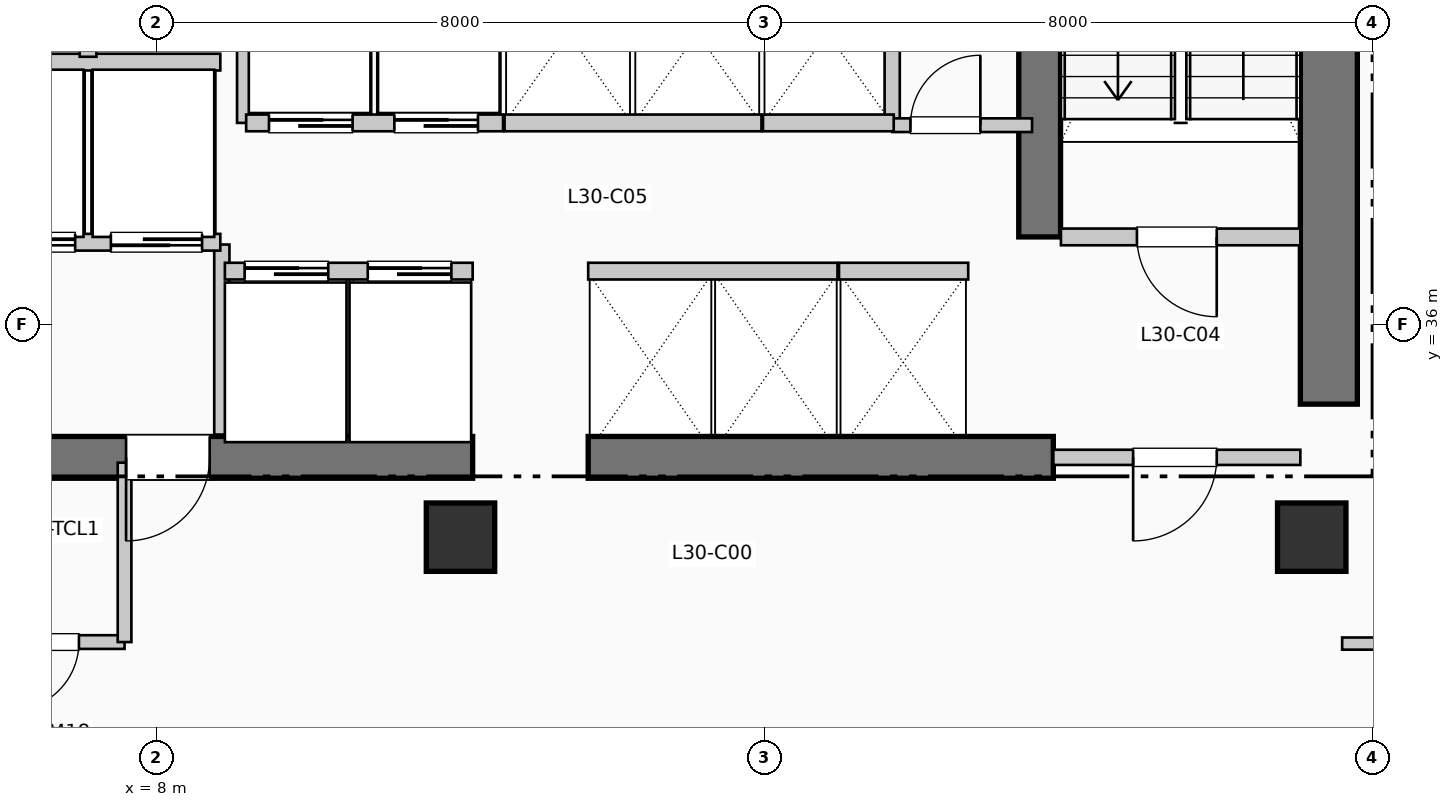
"""IFC4 building model, lengths in metres.
Left out: names, types, materials, properties, quantities, classifications, styles, units other than length and angle.
Written with IfcOpenShell. Run it as: python <this file> out.ifc"""

import sys

from ifc_helpers import new_model, si_unit, direction, frame, frame_2d, origin, origin_2d, place, context, subcontext, project, spatial, rectangle, extrude, element, fill, save


model = new_model("IFC4")
c1 = context("Model", 3, precision=1e-05, world=origin(), true_north=direction((0.0, 1.0)))
c2 = subcontext(c1, "Body", "Model", "MODEL_VIEW")
j1 = project(units=[si_unit("LENGTHUNIT", "METRE"), si_unit("PLANEANGLEUNIT", "RADIAN")], contexts=[c1])
p1 = place(None, origin())
s1 = spatial("IfcSite", under=j1, at=p1, CompositionType="ELEMENT")
p2 = place(p1, origin())
s2 = spatial("IfcBuilding", under=s1, at=p2, CompositionType="ELEMENT")
p3 = place(p2, frame((0.0, 0.0, 126.39)))
s3 = spatial("IfcBuildingStorey", under=s2, at=p3, CompositionType="ELEMENT", Elevation=126.39)
p4 = place(p3, frame((23.425, 34.95, 0.0), z_axis=(0.0, 0.0, 1.0), x_axis=(0.0, 1.0, 0.0)))
e1 = element("IfcWall", 1, at=p4, inside=s3, PredefinedType="SHEAR", context=c2, shape_type="SweptSolid", body=[
    extrude(rectangle(XDim=10.64, YDim=0.75, at=frame_2d((5.32, 0.0))), origin(), (0.0, 0.0, 1.0), 3.96),
])
p5 = place(p3, frame((1.45, 34.25, 0.0), z_axis=(0.0, 0.0, 1.0), x_axis=(1.0, 0.0, 0.0)))
e2 = element("IfcWall", 2, at=p5, inside=s3, PredefinedType="SHEAR", context=c2, shape_type="SweptSolid", body=[
    extrude(rectangle(XDim=10.71, YDim=0.55, at=frame_2d((5.355, 0.0))), origin(), (0.0, 0.0, 1.0), 3.96),
])
p6 = place(p5, frame((7.25, 0.0, 0.0), z_axis=(0.0, 0.0, 1.0), x_axis=(-1.0, 0.0, 0.0)))
e3 = element("IfcOpeningElement", 3, at=p6, cuts=e2, PredefinedType="OPENING", context=c2, shape_type="SweptSolid", body=[
    extrude(rectangle(XDim=1.1, YDim=2.15, at=frame_2d((0.55, 1.075))), frame((0.0, 0.285, 0.0), z_axis=(0.0, -1.0, 0.0), x_axis=(1.0, 0.0, 0.0)), (0.0, 0.0, 1.0), 0.57),
])
p7 = place(p3, frame((13.68, 34.25, 0.0), z_axis=(0.0, 0.0, 1.0), x_axis=(1.0, 0.0, 0.0)))
e4 = element("IfcWall", 4, at=p7, inside=s3, PredefinedType="SHEAR", context=c2, shape_type="SweptSolid", body=[
    extrude(rectangle(XDim=6.12, YDim=0.55, at=frame_2d((3.06, 0.0))), origin(), (0.0, 0.0, 1.0), 3.96),
])
p8 = place(p3, frame((19.62, 37.15, 0.0), z_axis=(0.0, 0.0, 1.0), x_axis=(0.0, 1.0, 0.0)))
e5 = element("IfcWall", 5, at=p8, inside=s3, PredefinedType="SHEAR", context=c2, shape_type="SweptSolid", body=[
    extrude(rectangle(XDim=7.89, YDim=0.55, at=frame_2d((3.945, 0.0))), origin(), (0.0, 0.0, 1.0), 3.96),
])
for number, where, z_axis, x_axis in (
    (6, (12.0, 33.2, 0.0), (0.0, 0.0, 1.0), (1.0, 0.0, 0.0)),
    (7, (23.2, 33.2, 0.0), (0.0, 0.0, 1.0), (1.0, 0.0, 0.0)),
):
    element("IfcColumn", number, at=place(p3, frame(where, z_axis=z_axis, x_axis=x_axis)), inside=s3, PredefinedType="COLUMN", context=c2, shape_type="SweptSolid", body=[
        extrude(rectangle(XDim=0.9, YDim=0.9, at=origin_2d()), origin(), (0.0, 0.0, 1.0), 3.96),
    ])
p9 = place(p3, frame((8.86, 34.55, 0.0), z_axis=(0.0, 0.0, 1.0), x_axis=(0.0, 1.0, 0.0)))
e8 = element("IfcWall", 8, at=p9, inside=s3, PredefinedType="PARTITIONING", context=c2, shape_type="SweptSolid", body=[
    extrude(rectangle(XDim=2.5, YDim=0.2, at=frame_2d((1.25, 0.0))), origin(), (0.0, 0.0, 1.0), 3.71),
])
p10 = place(p3, frame((19.9, 37.15, 0.0), z_axis=(0.0, 0.0, 1.0), x_axis=(1.0, 0.0, 0.0)))
e9 = element("IfcWall", 9, at=p10, inside=s3, PredefinedType="PARTITIONING", context=c2, shape_type="SweptSolid", body=[
    extrude(rectangle(XDim=3.15, YDim=0.22, at=frame_2d((1.575, 0.0))), origin(), (0.0, 0.0, 1.0), 3.71),
])
p11 = place(p10, frame((2.05, 0.0, 0.0), z_axis=(0.0, 0.0, 1.0), x_axis=(-1.0, 0.0, 0.0)))
e10 = element("IfcOpeningElement", 10, at=p11, cuts=e9, PredefinedType="OPENING", context=c2, shape_type="SweptSolid", body=[
    extrude(rectangle(XDim=1.05, YDim=2.15, at=frame_2d((0.525, 1.075))), frame((0.0, 0.12, 0.0), z_axis=(0.0, -1.0, 0.0), x_axis=(1.0, 0.0, 0.0)), (0.0, 0.0, 1.0), 0.24),
])
p12 = place(p3, frame((19.8, 34.25, 0.0), z_axis=(0.0, 0.0, 1.0), x_axis=(1.0, 0.0, 0.0)))
e11 = element("IfcWall", 11, at=p12, inside=s3, PredefinedType="PARTITIONING", context=c2, shape_type="SweptSolid", body=[
    extrude(rectangle(XDim=3.25, YDim=0.2, at=frame_2d((1.625, 0.0))), origin(), (0.0, 0.0, 1.0), 3.71),
])
p13 = place(p12, frame((2.15, 0.0, 0.0), z_axis=(0.0, 0.0, 1.0), x_axis=(-1.0, 0.0, 0.0)))
e12 = element("IfcOpeningElement", 12, at=p13, cuts=e11, PredefinedType="OPENING", context=c2, shape_type="SweptSolid", body=[
    extrude(rectangle(XDim=1.1, YDim=2.15, at=frame_2d((0.55, 1.075))), frame((0.0, 0.11, 0.0), z_axis=(0.0, -1.0, 0.0), x_axis=(1.0, 0.0, 0.0)), (0.0, 0.0, 1.0), 0.22),
])
p14 = place(p3, frame((5.38, 37.08, 0.0), z_axis=(0.0, 0.0, 1.0), x_axis=(1.0, 0.0, 0.0)))
e13 = element("IfcWall", 13, at=p14, inside=s3, PredefinedType="PARTITIONING", context=c2, shape_type="SweptSolid", body=[
    extrude(rectangle(XDim=3.46, YDim=0.22, at=frame_2d((1.73, 0.0))), origin(), (0.0, 0.0, 1.0), 3.71),
])
p15 = place(p14, frame((1.55, 0.0, 0.0), z_axis=(0.0, 0.0, 1.0), x_axis=(-1.0, 0.0, 0.0)))
e14 = element("IfcOpeningElement", 14, at=p15, cuts=e13, PredefinedType="OPENING", context=c2, shape_type="SweptSolid", body=[
    extrude(rectangle(XDim=1.2, YDim=2.2, at=frame_2d((0.6, 1.1))), frame((0.0, 0.12, 0.0), z_axis=(0.0, -1.0, 0.0), x_axis=(1.0, 0.0, 0.0)), (0.0, 0.0, 1.0), 0.24),
])
p16 = place(p14, frame((3.22, 0.0, 0.0), z_axis=(0.0, 0.0, 1.0), x_axis=(-1.0, 0.0, 0.0)))
e15 = element("IfcOpeningElement", 15, at=p16, cuts=e13, PredefinedType="OPENING", context=c2, shape_type="SweptSolid", body=[
    extrude(rectangle(XDim=1.2, YDim=2.2, at=frame_2d((0.6, 1.1))), frame((0.0, 0.12, 0.0), z_axis=(0.0, -1.0, 0.0), x_axis=(1.0, 0.0, 0.0)), (0.0, 0.0, 1.0), 0.24),
])
p17 = place(p3, frame((5.38, 39.45, 0.0), z_axis=(0.0, 0.0, 1.0), x_axis=(1.0, 0.0, 0.0)))
e16 = element("IfcWall", 16, at=p17, inside=s3, PredefinedType="PARTITIONING", context=c2, shape_type="SweptSolid", body=[
    extrude(rectangle(XDim=3.46, YDim=0.22, at=frame_2d((1.73, 0.0))), origin(), (0.0, 0.0, 1.0), 3.71),
])
p18 = place(p3, frame((7.1, 39.52, 0.0), z_axis=(0.0, 0.0, 1.0), x_axis=(0.0, 1.0, 0.0)))
e17 = element("IfcWall", 17, at=p18, inside=s3, PredefinedType="PARTITIONING", context=c2, shape_type="SweptSolid", body=[
    extrude(rectangle(XDim=2.93, YDim=0.22, at=frame_2d((1.465, 0.0))), origin(), (0.0, 0.0, 1.0), 3.71),
])
for number, where, z_axis, x_axis in (
    (18, (9.16, 38.65, 0.0), (0.0, 0.0, 1.0), (0.0, 1.0, 0.0)),
    (19, (17.68, 38.65, 0.0), (0.0, 0.0, 1.0), (0.0, 1.0, 0.0)),
):
    element("IfcWall", number, at=place(p3, frame(where, z_axis=z_axis, x_axis=x_axis)), inside=s3, PredefinedType="PARTITIONING", context=c2, shape_type="SweptSolid", body=[
        extrude(rectangle(XDim=2.35, YDim=0.2, at=frame_2d((1.175, 0.0))), origin(), (0.0, 0.0, 1.0), 3.71),
    ])
p19 = place(p3, frame((17.68, 38.62, 0.0), z_axis=(0.0, 0.0, 1.0), x_axis=(1.0, 0.0, 0.0)))
e20 = element("IfcWall", 20, at=p19, inside=s3, PredefinedType="PARTITIONING", context=c2, shape_type="SweptSolid", body=[
    extrude(rectangle(XDim=1.84, YDim=0.18, at=frame_2d((0.92, 0.0))), origin(), (0.0, 0.0, 1.0), 3.71),
])
p20 = place(p19, frame((0.24, 0.0, 0.0)))
e21 = element("IfcOpeningElement", 21, at=p20, cuts=e20, PredefinedType="OPENING", context=c2, shape_type="SweptSolid", body=[
    extrude(rectangle(XDim=0.92, YDim=2.1, at=frame_2d((0.46, 1.05))), frame((0.0, 0.1, 0.0), z_axis=(0.0, -1.0, 0.0), x_axis=(1.0, 0.0, 0.0)), (0.0, 0.0, 1.0), 0.2),
])
p21 = place(p3, frame((5.5, 31.82, 0.0), z_axis=(0.0, 0.0, 1.0), x_axis=(1.0, 0.0, 0.0)))
e22 = element("IfcWall", 22, at=p21, inside=s3, PredefinedType="PLUMBINGWALL", context=c2, shape_type="SweptSolid", body=[
    extrude(rectangle(XDim=2.08, YDim=0.18, at=frame_2d((1.04, 0.0))), origin(), (0.0, 0.0, 1.0), 3.71),
])
p22 = place(p21, frame((1.48, 0.0, 0.0), z_axis=(0.0, 0.0, 1.0), x_axis=(-1.0, 0.0, 0.0)))
e23 = element("IfcOpeningElement", 23, at=p22, cuts=e22, PredefinedType="OPENING", context=c2, shape_type="SweptSolid", body=[
    extrude(rectangle(XDim=0.9, YDim=2.1, at=frame_2d((0.45, 1.05))), frame((0.0, 0.1, 0.0), z_axis=(0.0, -1.0, 0.0), x_axis=(1.0, 0.0, 0.0)), (0.0, 0.0, 1.0), 0.2),
])
p23 = place(p3, frame((7.58, 31.82, 0.0), z_axis=(0.0, 0.0, 1.0), x_axis=(0.0, 1.0, 0.0)))
e24 = element("IfcWall", 24, at=p23, inside=s3, PredefinedType="PLUMBINGWALL", context=c2, shape_type="SweptSolid", body=[
    extrude(rectangle(XDim=2.36, YDim=0.18, at=frame_2d((1.18, 0.0))), origin(), (0.0, 0.0, 1.0), 3.71),
])
p24 = place(p3, frame((8.9, 36.7, 0.0), z_axis=(0.0, 0.0, 1.0), x_axis=(1.0, 0.0, 0.0)))
e25 = element("IfcWall", 25, at=p24, inside=s3, PredefinedType="PARTITIONING", context=c2, shape_type="SweptSolid", body=[
    extrude(rectangle(XDim=3.26, YDim=0.22, at=frame_2d((1.63, 0.0))), origin(), (0.0, 0.0, 1.0), 3.71),
])
p25 = place(p24, frame((0.26, 0.0, 0.0)))
e26 = element("IfcOpeningElement", 26, at=p25, cuts=e25, PredefinedType="OPENING", context=c2, shape_type="SweptSolid", body=[
    extrude(rectangle(XDim=1.1, YDim=2.2, at=frame_2d((0.55, 1.1))), frame((0.0, 0.12, 0.0), z_axis=(0.0, -1.0, 0.0), x_axis=(1.0, 0.0, 0.0)), (0.0, 0.0, 1.0), 0.24),
])
p26 = place(p24, frame((1.88, 0.0, 0.0)))
e27 = element("IfcOpeningElement", 27, at=p26, cuts=e25, PredefinedType="OPENING", context=c2, shape_type="SweptSolid", body=[
    extrude(rectangle(XDim=1.1, YDim=2.2, at=frame_2d((0.55, 1.1))), frame((0.0, 0.12, 0.0), z_axis=(0.0, -1.0, 0.0), x_axis=(1.0, 0.0, 0.0)), (0.0, 0.0, 1.0), 0.24),
])
p27 = place(p3, frame((9.18, 38.65, 0.0), z_axis=(0.0, 0.0, 1.0), x_axis=(1.0, 0.0, 0.0)))
e28 = element("IfcWall", 28, at=p27, inside=s3, PredefinedType="PARTITIONING", context=c2, shape_type="SweptSolid", body=[
    extrude(rectangle(XDim=3.38, YDim=0.22, at=frame_2d((1.69, 0.0))), origin(), (0.0, 0.0, 1.0), 3.71),
])
p28 = place(p27, frame((0.3, 0.0, 0.0)))
e29 = element("IfcOpeningElement", 29, at=p28, cuts=e28, PredefinedType="OPENING", context=c2, shape_type="SweptSolid", body=[
    extrude(rectangle(XDim=1.1, YDim=2.2, at=frame_2d((0.55, 1.1))), frame((0.0, 0.12, 0.0), z_axis=(0.0, -1.0, 0.0), x_axis=(1.0, 0.0, 0.0)), (0.0, 0.0, 1.0), 0.24),
])
p29 = place(p27, frame((1.95, 0.0, 0.0)))
e30 = element("IfcOpeningElement", 30, at=p29, cuts=e28, PredefinedType="OPENING", context=c2, shape_type="SweptSolid", body=[
    extrude(rectangle(XDim=1.1, YDim=2.2, at=frame_2d((0.55, 1.1))), frame((0.0, 0.12, 0.0), z_axis=(0.0, -1.0, 0.0), x_axis=(1.0, 0.0, 0.0)), (0.0, 0.0, 1.0), 0.24),
])
p30 = place(p3, frame((13.68, 36.7, 0.0), z_axis=(0.0, 0.0, 1.0), x_axis=(1.0, 0.0, 0.0)))
e31 = element("IfcWall", 31, at=p30, inside=s3, PredefinedType="PARTITIONING", context=c2, shape_type="SweptSolid", body=[
    extrude(rectangle(XDim=3.28, YDim=0.22, at=frame_2d((1.64, 0.0))), origin(), (0.0, 0.0, 1.0), 3.71),
])
p31 = place(p3, frame((12.58, 38.65, 0.0), z_axis=(0.0, 0.0, 1.0), x_axis=(1.0, 0.0, 0.0)))
e32 = element("IfcWall", 32, at=p31, inside=s3, PredefinedType="PARTITIONING", context=c2, shape_type="SweptSolid", body=[
    extrude(rectangle(XDim=3.38, YDim=0.22, at=frame_2d((1.69, 0.0))), origin(), (0.0, 0.0, 1.0), 3.71),
])
p32 = place(p3, frame((16.98, 36.7, 0.0), z_axis=(0.0, 0.0, 1.0), x_axis=(1.0, 0.0, 0.0)))
e33 = element("IfcWall", 33, at=p32, inside=s3, PredefinedType="PARTITIONING", context=c2, shape_type="SweptSolid", body=[
    extrude(rectangle(XDim=1.7, YDim=0.22, at=frame_2d((0.85, 0.0))), origin(), (0.0, 0.0, 1.0), 3.71),
])
p33 = place(p3, frame((15.98, 38.65, 0.0), z_axis=(0.0, 0.0, 1.0), x_axis=(1.0, 0.0, 0.0)))
e34 = element("IfcWall", 34, at=p33, inside=s3, PredefinedType="PARTITIONING", context=c2, shape_type="SweptSolid", body=[
    extrude(rectangle(XDim=1.72, YDim=0.22, at=frame_2d((0.86, 0.0))), origin(), (0.0, 0.0, 1.0), 3.71),
])
p34 = place(p3, frame((23.6, 31.8, 0.0), z_axis=(0.0, 0.0, 1.0), x_axis=(1.0, 0.0, 0.0)))
e35 = element("IfcWall", 35, at=p34, inside=s3, PredefinedType="PARTITIONING", context=c2, shape_type="SweptSolid", body=[
    extrude(rectangle(XDim=26.41, YDim=0.16, at=frame_2d((13.205, 0.0))), origin(), (0.0, 0.0, 1.0), 3.71),
])
p35 = place(p34, frame((4.147, 0.0, 0.0)))
e36 = element("IfcOpeningElement", 36, at=p35, cuts=e35, PredefinedType="OPENING", context=c2, shape_type="SweptSolid", body=[
    extrude(rectangle(XDim=0.95, YDim=2.15, at=frame_2d((0.475, 1.075))), frame((0.0, 0.09, 0.0), z_axis=(0.0, -1.0, 0.0), x_axis=(1.0, 0.0, 0.0)), (0.0, 0.0, 1.0), 0.18),
])
p36 = place(p34, frame((13.39, 0.0, 0.0)))
e37 = element("IfcOpeningElement", 37, at=p36, cuts=e35, PredefinedType="OPENING", context=c2, shape_type="SweptSolid", body=[
    extrude(rectangle(XDim=0.95, YDim=2.15, at=frame_2d((0.475, 1.075))), frame((0.0, 0.09, 0.0), z_axis=(0.0, -1.0, 0.0), x_axis=(1.0, 0.0, 0.0)), (0.0, 0.0, 1.0), 0.18),
])
p37 = place(p34, frame((21.973, 0.0, 0.0)))
e38 = element("IfcOpeningElement", 38, at=p37, cuts=e35, PredefinedType="OPENING", context=c2, shape_type="SweptSolid", body=[
    extrude(rectangle(XDim=0.95, YDim=2.15, at=frame_2d((0.475, 1.075))), frame((0.0, 0.09, 0.0), z_axis=(0.0, -1.0, 0.0), x_axis=(1.0, 0.0, 0.0)), (0.0, 0.0, 1.0), 0.18),
])
p38 = place(p6, origin())
e39 = element("IfcDoor", 39, at=p38, inside=s3, OperationType="SINGLE_SWING_LEFT", PredefinedType="DOOR", context=c2, shape_type="SweptSolid", body=[
    extrude(rectangle(XDim=1.1, YDim=2.15, at=frame_2d((0.55, 1.075))), frame((0.0, 0.025, 0.0), z_axis=(0.0, -1.0, 0.0), x_axis=(1.0, 0.0, 0.0)), (0.0, 0.0, 1.0), 0.05),
])
fill(e3, e39)
p39 = place(p11, origin())
e40 = element("IfcDoor", 40, at=p39, inside=s3, OperationType="SINGLE_SWING_RIGHT", PredefinedType="DOOR", context=c2, shape_type="SweptSolid", body=[
    extrude(rectangle(XDim=1.05, YDim=2.15, at=frame_2d((0.525, 1.075))), frame((0.0, 0.025, 0.0), z_axis=(0.0, -1.0, 0.0), x_axis=(1.0, 0.0, 0.0)), (0.0, 0.0, 1.0), 0.05),
])
fill(e10, e40)
p40 = place(p13, origin())
e41 = element("IfcDoor", 41, at=p40, inside=s3, OperationType="SINGLE_SWING_LEFT", PredefinedType="DOOR", context=c2, shape_type="SweptSolid", body=[
    extrude(rectangle(XDim=1.1, YDim=2.15, at=frame_2d((0.55, 1.075))), frame((0.0, 0.025, 0.0), z_axis=(0.0, -1.0, 0.0), x_axis=(1.0, 0.0, 0.0)), (0.0, 0.0, 1.0), 0.05),
])
fill(e12, e41)
p41 = place(p15, origin())
e42 = element("IfcDoor", 42, at=p41, inside=s3, OperationType="SLIDING_TO_RIGHT", PredefinedType="DOOR", context=c2, shape_type="SweptSolid", body=[
    extrude(rectangle(XDim=1.2, YDim=2.2, at=frame_2d((0.6, 1.1))), frame((0.0, 0.025, 0.0), z_axis=(0.0, -1.0, 0.0), x_axis=(1.0, 0.0, 0.0)), (0.0, 0.0, 1.0), 0.05),
])
fill(e14, e42)
p42 = place(p16, origin())
e43 = element("IfcDoor", 43, at=p42, inside=s3, OperationType="SLIDING_TO_RIGHT", PredefinedType="DOOR", context=c2, shape_type="SweptSolid", body=[
    extrude(rectangle(XDim=1.2, YDim=2.2, at=frame_2d((0.6, 1.1))), frame((0.0, 0.025, 0.0), z_axis=(0.0, -1.0, 0.0), x_axis=(1.0, 0.0, 0.0)), (0.0, 0.0, 1.0), 0.05),
])
fill(e15, e43)
p43 = place(p20, origin())
e44 = element("IfcDoor", 44, at=p43, inside=s3, OperationType="SINGLE_SWING_RIGHT", PredefinedType="DOOR", context=c2, shape_type="SweptSolid", body=[
    extrude(rectangle(XDim=0.92, YDim=2.1, at=frame_2d((0.46, 1.05))), frame((0.0, 0.025, 0.0), z_axis=(0.0, -1.0, 0.0), x_axis=(1.0, 0.0, 0.0)), (0.0, 0.0, 1.0), 0.05),
])
fill(e21, e44)
p44 = place(p22, origin())
e45 = element("IfcDoor", 45, at=p44, inside=s3, OperationType="SINGLE_SWING_LEFT", PredefinedType="DOOR", context=c2, shape_type="SweptSolid", body=[
    extrude(rectangle(XDim=0.9, YDim=2.1, at=frame_2d((0.45, 1.05))), frame((0.0, 0.025, 0.0), z_axis=(0.0, -1.0, 0.0), x_axis=(1.0, 0.0, 0.0)), (0.0, 0.0, 1.0), 0.05),
])
fill(e23, e45)
p45 = place(p25, origin())
e46 = element("IfcDoor", 46, at=p45, inside=s3, OperationType="SLIDING_TO_LEFT", PredefinedType="DOOR", context=c2, shape_type="SweptSolid", body=[
    extrude(rectangle(XDim=1.1, YDim=2.2, at=frame_2d((0.55, 1.1))), frame((0.0, 0.025, 0.0), z_axis=(0.0, -1.0, 0.0), x_axis=(1.0, 0.0, 0.0)), (0.0, 0.0, 1.0), 0.05),
])
fill(e26, e46)
p46 = place(p26, origin())
e47 = element("IfcDoor", 47, at=p46, inside=s3, OperationType="SLIDING_TO_LEFT", PredefinedType="DOOR", context=c2, shape_type="SweptSolid", body=[
    extrude(rectangle(XDim=1.1, YDim=2.2, at=frame_2d((0.55, 1.1))), frame((0.0, 0.025, 0.0), z_axis=(0.0, -1.0, 0.0), x_axis=(1.0, 0.0, 0.0)), (0.0, 0.0, 1.0), 0.05),
])
fill(e27, e47)
p47 = place(p28, origin())
e48 = element("IfcDoor", 48, at=p47, inside=s3, OperationType="SLIDING_TO_LEFT", PredefinedType="DOOR", context=c2, shape_type="SweptSolid", body=[
    extrude(rectangle(XDim=1.1, YDim=2.2, at=frame_2d((0.55, 1.1))), frame((0.0, 0.025, 0.0), z_axis=(0.0, -1.0, 0.0), x_axis=(1.0, 0.0, 0.0)), (0.0, 0.0, 1.0), 0.05),
])
fill(e29, e48)
p48 = place(p29, origin())
e49 = element("IfcDoor", 49, at=p48, inside=s3, OperationType="SLIDING_TO_LEFT", PredefinedType="DOOR", context=c2, shape_type="SweptSolid", body=[
    extrude(rectangle(XDim=1.1, YDim=2.2, at=frame_2d((0.55, 1.1))), frame((0.0, 0.025, 0.0), z_axis=(0.0, -1.0, 0.0), x_axis=(1.0, 0.0, 0.0)), (0.0, 0.0, 1.0), 0.05),
])
fill(e30, e49)
save(model, sys.argv[1])
